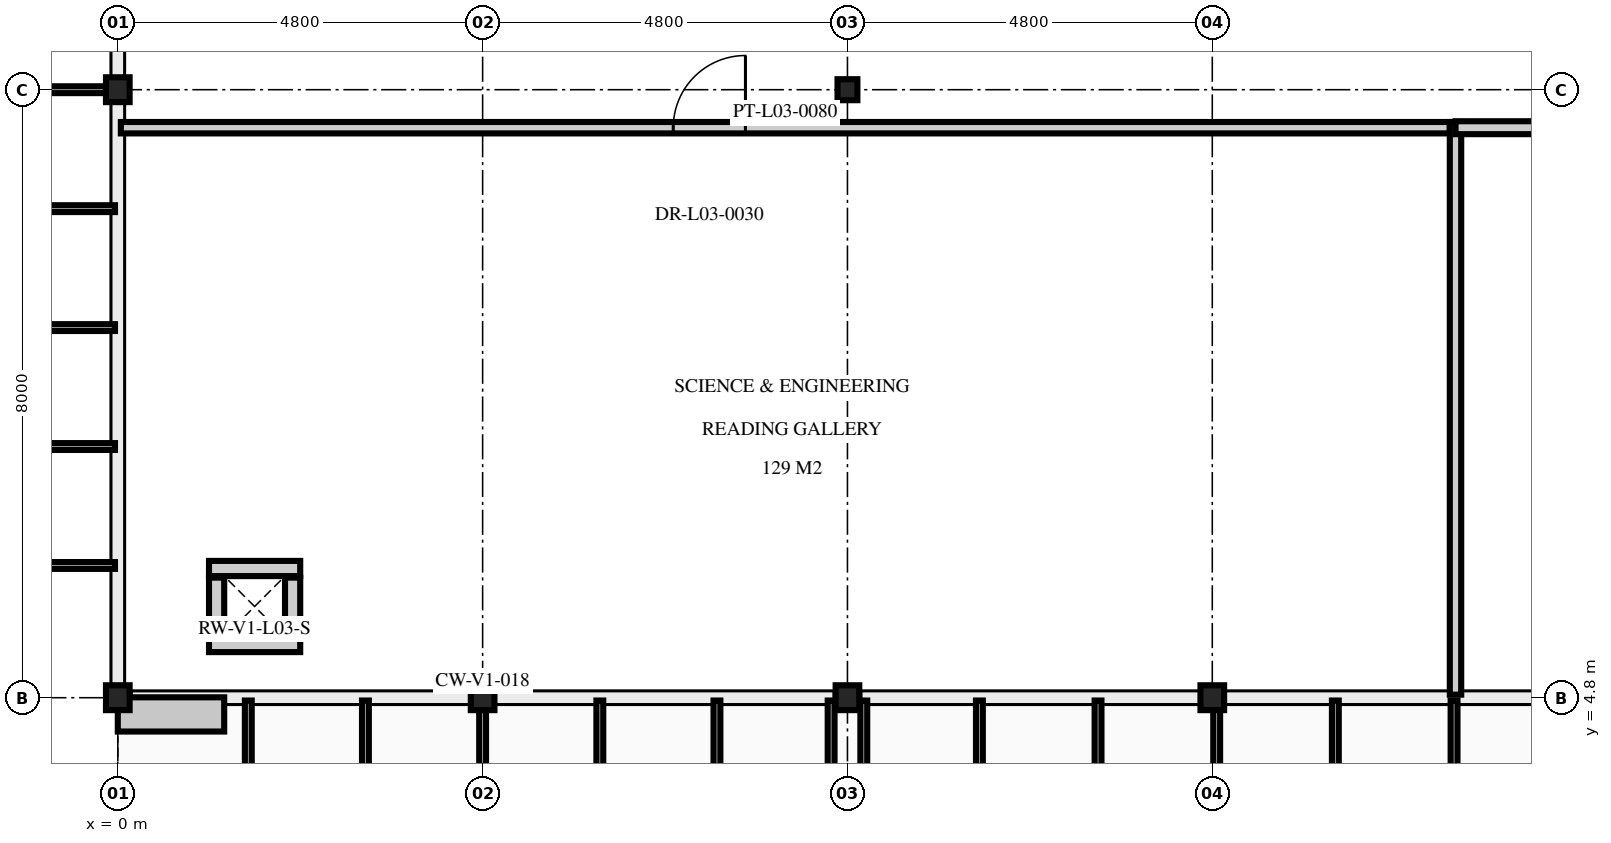
"""IFC4 building model, lengths in metres.
Left out: names, types, materials, properties, quantities, classifications, styles, units other than length and angle.
Written with IfcOpenShell. Run it as: python <this file> out.ifc"""

import sys

from ifc_helpers import new_model, si_unit, direction, frame, frame_2d, origin, origin_2d, place, context, subcontext, project, spatial, rectangle, i_section, extrude, element, fill, save


model = new_model("IFC4")
c1 = context("Model", 3, precision=1e-05, world=origin(), true_north=direction((0.0, 1.0)))
c2 = subcontext(c1, "Body", "Model", "MODEL_VIEW")
j1 = project(units=[si_unit("LENGTHUNIT", "METRE"), si_unit("PLANEANGLEUNIT", "RADIAN")], contexts=[c1])
p1 = place(None, origin())
s1 = spatial("IfcSite", under=j1, at=p1, CompositionType="ELEMENT")
p2 = place(p1, origin())
s2 = spatial("IfcBuilding", under=s1, at=p2, CompositionType="ELEMENT")
p3 = place(p2, frame((0.0, 0.0, 14.1)))
s3 = spatial("IfcBuildingStorey", under=s2, at=p3, CompositionType="ELEMENT", Elevation=14.1)
for number, where, z_axis, x_axis in (
    (1, (0.0, 4.8, 0.0), (0.0, 0.0, 1.0), (1.0, 0.0, 0.0)),
    (2, (4.8, 4.8, 0.0), (0.0, 0.0, 1.0), (1.0, 0.0, 0.0)),
    (3, (9.6, 4.8, 0.0), (0.0, 0.0, 1.0), (1.0, 0.0, 0.0)),
    (4, (14.4, 4.8, 0.0), (0.0, 0.0, 1.0), (1.0, 0.0, 0.0)),
    (5, (0.0, 12.8, 0.0), (0.0, 0.0, 1.0), (1.0, 0.0, 0.0)),
):
    element("IfcColumn", number, at=place(p3, frame(where, z_axis=z_axis, x_axis=x_axis)), inside=s3, PredefinedType="COLUMN", context=c2, shape_type="SweptSolid", body=[
        extrude(i_section(OverallWidth=0.311, OverallDepth=0.327, WebThickness=0.016, FlangeThickness=0.025, at=origin_2d()), origin(), (0.0, 0.0, 1.0), 4.5),
    ])
p4 = place(p3, frame((9.6, 12.8, 0.0), z_axis=(0.0, 0.0, 1.0), x_axis=(1.0, 0.0, 0.0)))
e6 = element("IfcColumn", 6, at=p4, inside=s3, PredefinedType="COLUMN", context=c2, shape_type="SweptSolid", body=[
    extrude(i_section(OverallWidth=0.261, OverallDepth=0.276, WebThickness=0.015, FlangeThickness=0.025, at=origin_2d()), origin(), (0.0, 0.0, 1.0), 4.5),
])
for number, where, z_axis, x_axis in (
    (7, (2.4, 5.5, 0.0), (0.0, 0.0, 1.0), (-1.0, 0.0, 0.0)),
    (8, (1.2, 6.5, 0.0), (0.0, 0.0, 1.0), (1.0, 0.0, 0.0)),
):
    element("IfcWall", number, at=place(p3, frame(where, z_axis=z_axis, x_axis=x_axis)), inside=s3, PredefinedType="PARTITIONING", context=c2, shape_type="SweptSolid", body=[
        extrude(rectangle(XDim=1.2, YDim=0.2, at=frame_2d((0.6, 0.0))), origin(), (0.0, 0.0, 1.0), 3.75),
    ])
for number, where, z_axis, x_axis in (
    (9, (1.3, 5.62, 0.0), (0.0, 0.0, 1.0), (0.0, 1.0, 0.0)),
    (10, (2.3, 6.38, 0.0), (0.0, 0.0, 1.0), (0.0, -1.0, 0.0)),
):
    element("IfcWall", number, at=place(p3, frame(where, z_axis=z_axis, x_axis=x_axis)), inside=s3, PredefinedType="PARTITIONING", context=c2, shape_type="SweptSolid", body=[
        extrude(rectangle(XDim=0.76, YDim=0.2, at=frame_2d((0.38, 0.0))), origin(), (0.0, 0.0, 1.0), 3.75),
    ])
p5 = place(p3, frame((0.04, 12.3, 0.0), z_axis=(0.0, 0.0, 1.0), x_axis=(1.0, 0.0, 0.0)))
e11 = element("IfcWall", 11, at=p5, inside=s3, PredefinedType="PARTITIONING", context=c2, shape_type="SweptSolid", body=[
    extrude(rectangle(XDim=17.485, YDim=0.15, at=frame_2d((8.742, 0.0))), origin(), (0.0, 0.0, 1.0), 3.625),
])
p6 = place(p5, frame((7.268, 0.0, 0.0)))
e12 = element("IfcOpeningElement", 12, at=p6, cuts=e11, PredefinedType="OPENING", context=c2, shape_type="SweptSolid", body=[
    extrude(rectangle(XDim=0.95, YDim=2.15, at=frame_2d((0.475, 1.075))), frame((0.0, 0.085, 0.0), z_axis=(0.0, -1.0, 0.0), x_axis=(1.0, 0.0, 0.0)), (0.0, 0.0, 1.0), 0.17),
])
p7 = place(p3, frame((17.6, 4.84, 0.0), z_axis=(0.0, 0.0, 1.0), x_axis=(0.0, 1.0, 0.0)))
e13 = element("IfcWall", 13, at=p7, inside=s3, PredefinedType="PARTITIONING", context=c2, shape_type="SweptSolid", body=[
    extrude(rectangle(XDim=7.535, YDim=0.15, at=frame_2d((3.768, 0.0))), origin(), (0.0, 0.0, 1.0), 3.675),
])
p8 = place(p3, frame((17.6, 12.3, 0.0), z_axis=(0.0, 0.0, 1.0), x_axis=(1.0, 0.0, 0.0)))
e14 = element("IfcWall", 14, at=p8, inside=s3, PredefinedType="PARTITIONING", context=c2, shape_type="SweptSolid", body=[
    extrude(rectangle(XDim=6.315, YDim=0.17, at=frame_2d((3.157, 0.0))), origin(), (0.0, 0.0, 1.0), 3.625),
])
p9 = place(p8, frame((2.682, 0.0, 0.0)))
e15 = element("IfcOpeningElement", 15, at=p9, cuts=e14, PredefinedType="OPENING", context=c2, shape_type="SweptSolid", body=[
    extrude(rectangle(XDim=0.95, YDim=2.15, at=frame_2d((0.475, 1.075))), frame((0.0, 0.095, 0.0), z_axis=(0.0, -1.0, 0.0), x_axis=(1.0, 0.0, 0.0)), (0.0, 0.0, 1.0), 0.19),
])
p10 = place(p6, origin())
e16 = element("IfcDoor", 16, at=p10, inside=s3, OperationType="SINGLE_SWING_RIGHT", PredefinedType="DOOR", context=c2, shape_type="SweptSolid", body=[
    extrude(rectangle(XDim=0.95, YDim=2.15, at=frame_2d((0.475, 1.075))), frame((0.0, 0.025, 0.0), z_axis=(0.0, -1.0, 0.0), x_axis=(1.0, 0.0, 0.0)), (0.0, 0.0, 1.0), 0.05),
])
fill(e12, e16)
save(model, sys.argv[1])
